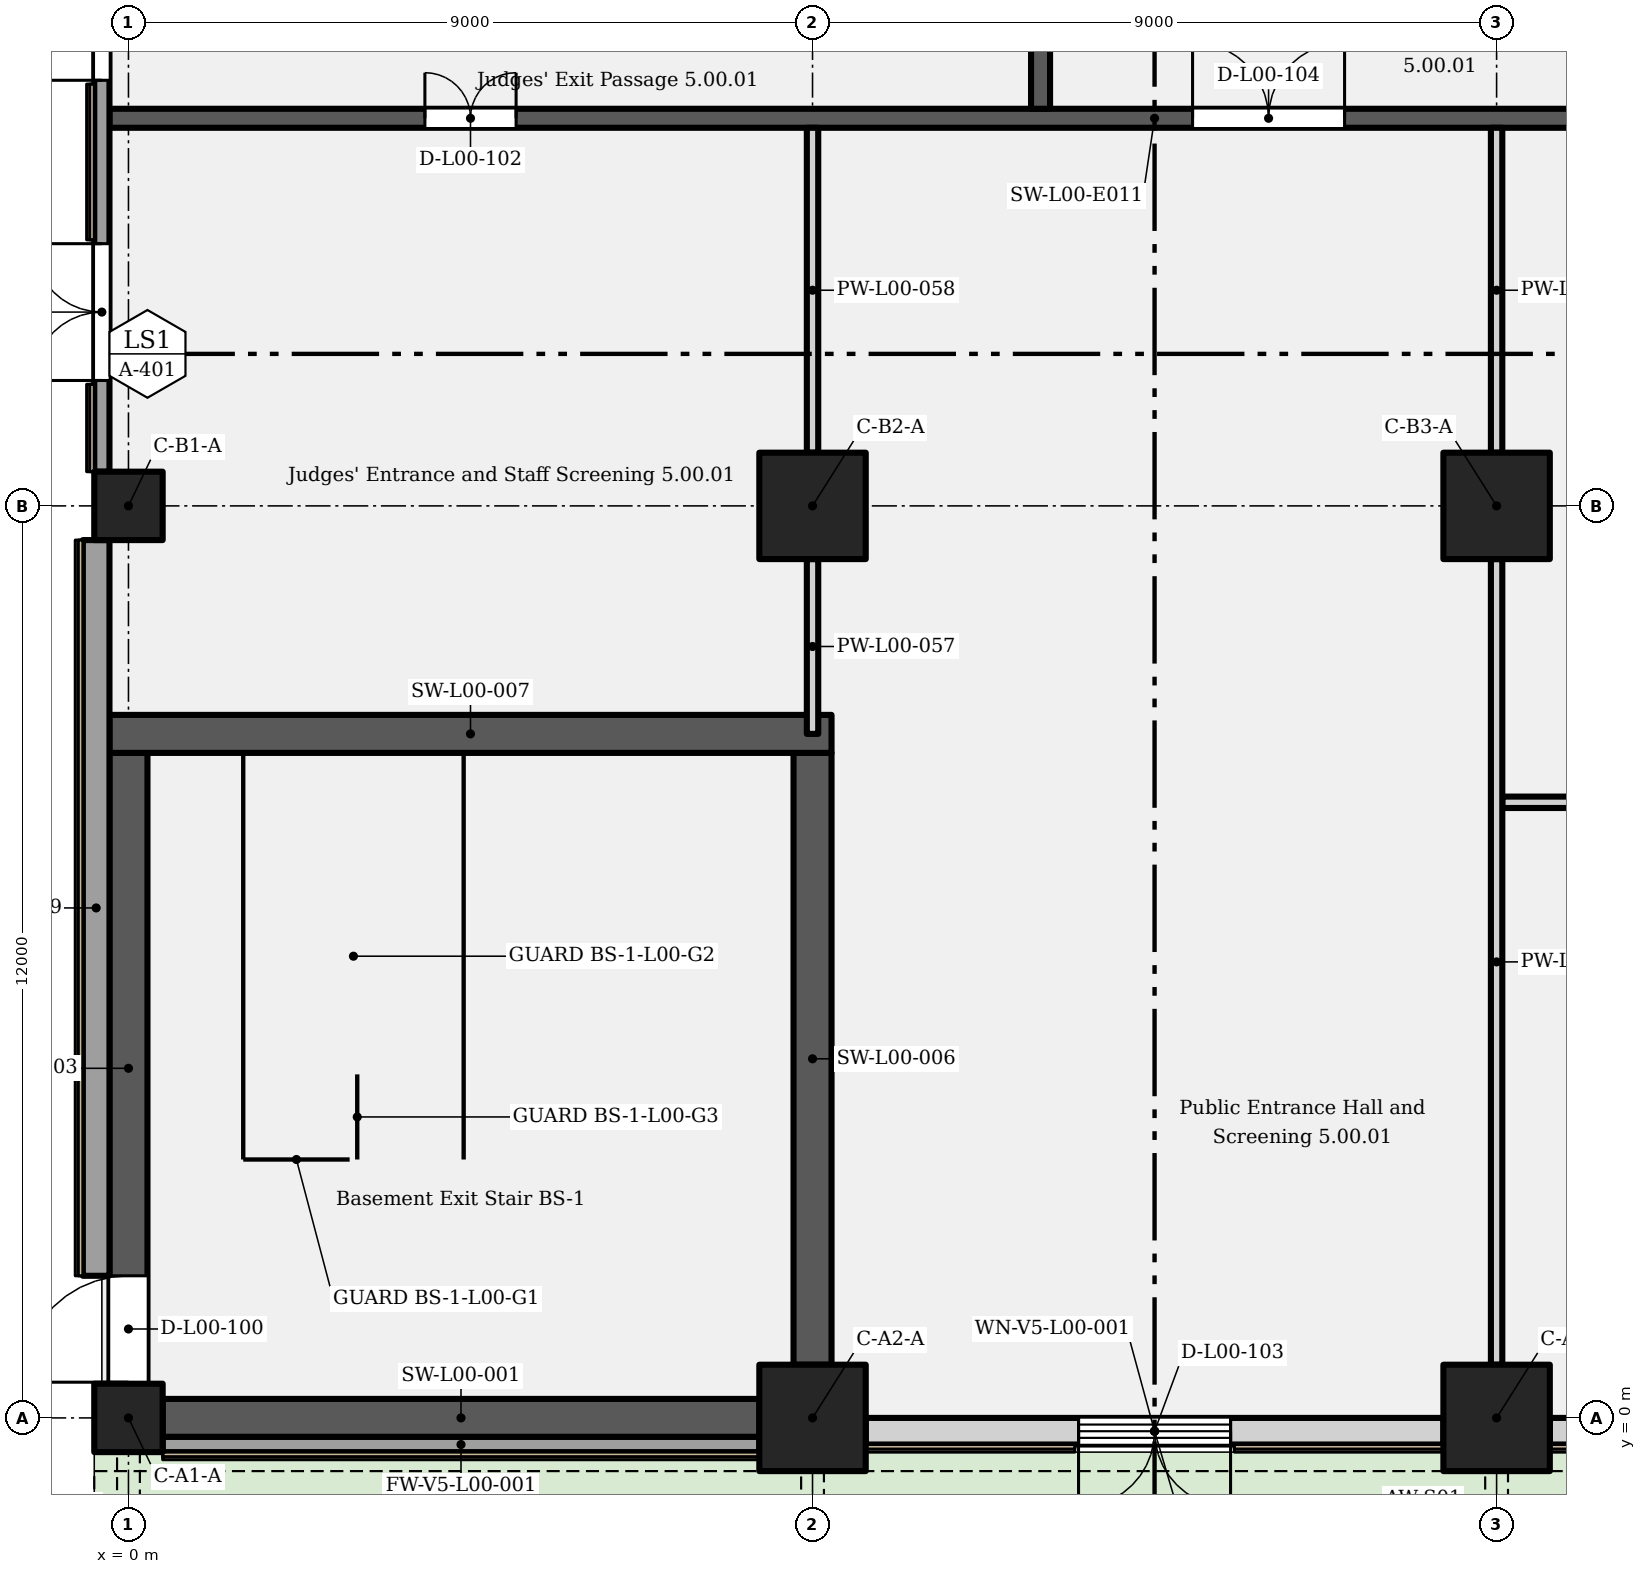
"""IFC4 building model, lengths in metres.
Left out: names, types, materials, properties, quantities, classifications, styles, units other than length and angle.
Written with IfcOpenShell. Run it as: python <this file> out.ifc"""

import sys

from ifc_helpers import new_model, si_unit, direction, frame, frame_2d, origin, origin_with_axes, origin_2d, place, context, subcontext, project, spatial, rectangle, extrude, element, fill, save


model = new_model("IFC4")
c1 = context("Model", 3, precision=1e-05, world=origin(), true_north=direction((0.0, 1.0)))
c2 = subcontext(c1, "Body", "Model", "MODEL_VIEW")
j1 = project(units=[si_unit("LENGTHUNIT", "METRE"), si_unit("PLANEANGLEUNIT", "RADIAN")], contexts=[c1])
p1 = place(None, origin())
s1 = spatial("IfcSite", under=j1, at=p1, CompositionType="ELEMENT")
p2 = place(p1, origin())
s2 = spatial("IfcBuilding", under=s1, at=p2, CompositionType="ELEMENT")
p3 = place(p2, origin())
s3 = spatial("IfcBuildingStorey", under=s2, at=p3, CompositionType="ELEMENT", Elevation=0.0)
p4 = place(p3, origin_with_axes())
e1 = element("IfcColumn", 1, at=p4, inside=s3, PredefinedType="COLUMN", context=c2, shape_type="SweptSolid", body=[
    extrude(rectangle(XDim=0.9, YDim=0.9, at=origin_2d()), origin(), (0.0, 0.0, 1.0), 6.6),
])
for number, where, z_axis, x_axis in (
    (2, (9.0, 0.0, 0.0), (0.0, 0.0, 1.0), (1.0, 0.0, 0.0)),
    (3, (18.0, 0.0, 0.0), (0.0, 0.0, 1.0), (1.0, 0.0, 0.0)),
):
    element("IfcColumn", number, at=place(p3, frame(where, z_axis=z_axis, x_axis=x_axis)), inside=s3, PredefinedType="COLUMN", context=c2, shape_type="SweptSolid", body=[
        extrude(rectangle(XDim=1.4, YDim=1.4, at=origin_2d()), origin(), (0.0, 0.0, 1.0), 6.6),
    ])
p5 = place(p3, frame((0.0, 12.0, 0.0), z_axis=(0.0, 0.0, 1.0), x_axis=(1.0, 0.0, 0.0)))
e4 = element("IfcColumn", 4, at=p5, inside=s3, PredefinedType="COLUMN", context=c2, shape_type="SweptSolid", body=[
    extrude(rectangle(XDim=0.9, YDim=0.9, at=origin_2d()), origin(), (0.0, 0.0, 1.0), 6.6),
])
for number, where, z_axis, x_axis in (
    (5, (9.0, 12.0, 0.0), (0.0, 0.0, 1.0), (1.0, 0.0, 0.0)),
    (6, (18.0, 12.0, 0.0), (0.0, 0.0, 1.0), (1.0, 0.0, 0.0)),
):
    element("IfcColumn", number, at=place(p3, frame(where, z_axis=z_axis, x_axis=x_axis)), inside=s3, PredefinedType="COLUMN", context=c2, shape_type="SweptSolid", body=[
        extrude(rectangle(XDim=1.4, YDim=1.4, at=origin_2d()), origin(), (0.0, 0.0, 1.0), 6.6),
    ])
p6 = place(p3, frame((0.45, 0.0, 0.0), z_axis=(0.0, 0.0, 1.0), x_axis=(1.0, 0.0, 0.0)))
e7 = element("IfcWall", 7, at=p6, inside=s3, PredefinedType="SHEAR", context=c2, shape_type="SweptSolid", body=[
    extrude(rectangle(XDim=7.85, YDim=0.5, at=frame_2d((3.925, 0.0))), origin(), (0.0, 0.0, 1.0), 6.3),
])
p7 = place(p3, frame((0.0, 0.45, 0.0), z_axis=(0.0, 0.0, 1.0), x_axis=(0.0, 1.0, 0.0)))
e8 = element("IfcWall", 8, at=p7, inside=s3, PredefinedType="SHEAR", context=c2, shape_type="SweptSolid", body=[
    extrude(rectangle(XDim=8.3, YDim=0.5, at=frame_2d((4.15, 0.0))), origin(), (0.0, 0.0, 1.0), 6.3),
])
p8 = place(p7, frame((0.02, 0.0, 0.0)))
e9 = element("IfcOpeningElement", 9, at=p8, cuts=e8, PredefinedType="OPENING", context=c2, shape_type="SweptSolid", body=[
    extrude(rectangle(XDim=1.4, YDim=2.1, at=frame_2d((0.7, 1.05))), frame((0.0, 0.26, 0.0), z_axis=(0.0, -1.0, 0.0), x_axis=(1.0, 0.0, 0.0)), (0.0, 0.0, 1.0), 0.52),
])
p9 = place(p3, frame((9.0, 0.7, 0.0), z_axis=(0.0, 0.0, 1.0), x_axis=(0.0, 1.0, 0.0)))
e10 = element("IfcWall", 10, at=p9, inside=s3, PredefinedType="SHEAR", context=c2, shape_type="SweptSolid", body=[
    extrude(rectangle(XDim=8.05, YDim=0.5, at=frame_2d((4.025, 0.0))), origin(), (0.0, 0.0, 1.0), 6.3),
])
p10 = place(p3, frame((-0.25, 9.0, 0.0), z_axis=(0.0, 0.0, 1.0), x_axis=(1.0, 0.0, 0.0)))
e11 = element("IfcWall", 11, at=p10, inside=s3, PredefinedType="SHEAR", context=c2, shape_type="SweptSolid", body=[
    extrude(rectangle(XDim=9.5, YDim=0.5, at=frame_2d((4.75, 0.0))), origin(), (0.0, 0.0, 1.0), 6.3),
])
p11 = place(p3, frame((0.45, -0.35, 0.0), z_axis=(0.0, 0.0, 1.0), x_axis=(1.0, 0.0, 0.0)))
e12 = element("IfcWall", 12, at=p11, inside=s3, PredefinedType="SOLIDWALL", context=c2, shape_type="SweptSolid", body=[
    extrude(rectangle(XDim=7.85, YDim=0.2, at=frame_2d((3.925, 0.0))), origin(), (0.0, 0.0, 1.0), 6.3),
])
p12 = place(p3, frame((9.7, -0.175, 0.0), z_axis=(0.0, 0.0, 1.0), x_axis=(1.0, 0.0, 0.0)))
e13 = element("IfcWall", 13, at=p12, inside=s3, PredefinedType="SOLIDWALL", context=c2, shape_type="SweptSolid", body=[
    extrude(rectangle(XDim=7.6, YDim=0.35, at=frame_2d((3.8, 0.0))), origin(), (0.0, 0.0, 1.0), 6.3),
])
p13 = place(p12, frame((4.8, 0.0, 0.0), z_axis=(0.0, 0.0, 1.0), x_axis=(-1.0, 0.0, 0.0)))
e14 = element("IfcOpeningElement", 14, at=p13, cuts=e13, PredefinedType="OPENING", context=c2, shape_type="SweptSolid", body=[
    extrude(rectangle(XDim=2.0, YDim=2.1, at=frame_2d((1.0, 1.05))), frame((0.0, 0.185, 0.0), z_axis=(0.0, -1.0, 0.0), x_axis=(1.0, 0.0, 0.0)), (0.0, 0.0, 1.0), 0.37),
])
p14 = place(p12, frame((2.8, 0.0, 2.25)))
e15 = element("IfcOpeningElement", 15, at=p14, cuts=e13, PredefinedType="OPENING", context=c2, shape_type="SweptSolid", body=[
    extrude(rectangle(XDim=2.0, YDim=0.8, at=frame_2d((1.0, 0.4))), frame((0.0, 0.185, 0.0), z_axis=(0.0, -1.0, 0.0), x_axis=(1.0, 0.0, 0.0)), (0.0, 0.0, 1.0), 0.37),
])
p15 = place(p3, frame((18.7, -0.175, 0.0), z_axis=(0.0, 0.0, 1.0), x_axis=(1.0, 0.0, 0.0)))
e16 = element("IfcWall", 16, at=p15, inside=s3, PredefinedType="SOLIDWALL", context=c2, shape_type="SweptSolid", body=[
    extrude(rectangle(XDim=7.6, YDim=0.35, at=frame_2d((3.8, 0.0))), origin(), (0.0, 0.0, 1.0), 6.3),
])
p16 = place(p3, frame((-0.425, 1.87, 0.0), z_axis=(0.0, 0.0, 1.0), x_axis=(0.0, 1.0, 0.0)))
e17 = element("IfcWall", 17, at=p16, inside=s3, PredefinedType="SOLIDWALL", context=c2, shape_type="SweptSolid", body=[
    extrude(rectangle(XDim=9.68, YDim=0.35, at=frame_2d((4.84, 0.0))), origin(), (0.0, 0.0, 1.0), 6.3),
])
p17 = place(p3, frame((-0.35, 12.45, 0.0), z_axis=(0.0, 0.0, 1.0), x_axis=(0.0, 1.0, 0.0)))
e18 = element("IfcWall", 18, at=p17, inside=s3, PredefinedType="SOLIDWALL", context=c2, shape_type="SweptSolid", body=[
    extrude(rectangle(XDim=15.6, YDim=0.2, at=frame_2d((7.8, 0.0))), origin(), (0.0, 0.0, 1.0), 6.3),
])
p18 = place(p17, frame((1.2, 0.0, 0.0)))
e19 = element("IfcOpeningElement", 19, at=p18, cuts=e18, PredefinedType="OPENING", context=c2, shape_type="SweptSolid", body=[
    extrude(rectangle(XDim=1.8, YDim=2.1, at=frame_2d((0.9, 1.05))), frame((0.0, 0.11, 0.0), z_axis=(0.0, -1.0, 0.0), x_axis=(1.0, 0.0, 0.0)), (0.0, 0.0, 1.0), 0.22),
])
p19 = place(p17, frame((5.15, 0.0, 0.0)))
e20 = element("IfcOpeningElement", 20, at=p19, cuts=e18, PredefinedType="OPENING", context=c2, shape_type="SweptSolid", body=[
    extrude(rectangle(XDim=1.4, YDim=2.1, at=frame_2d((0.7, 1.05))), frame((0.0, 0.11, 0.0), z_axis=(0.0, -1.0, 0.0), x_axis=(1.0, 0.0, 0.0)), (0.0, 0.0, 1.0), 0.22),
])
p20 = place(p3, frame((18.075, 8.1, 0.0), z_axis=(0.0, 0.0, 1.0), x_axis=(1.0, 0.0, 0.0)))
e21 = element("IfcWall", 21, at=p20, inside=s3, PredefinedType="PARTITIONING", context=c2, shape_type="SweptSolid", body=[
    extrude(rectangle(XDim=4.5, YDim=0.15, at=frame_2d((2.25, 0.0))), origin(), (0.0, 0.0, 1.0), 6.3),
])
p21 = place(p20, frame((2.675, 0.0, 0.0), z_axis=(0.0, 0.0, 1.0), x_axis=(-1.0, 0.0, 0.0)))
e22 = element("IfcOpeningElement", 22, at=p21, cuts=e21, PredefinedType="OPENING", context=c2, shape_type="SweptSolid", body=[
    extrude(rectangle(XDim=1.0, YDim=2.1, at=frame_2d((0.5, 1.05))), frame((0.0, 0.085, 0.0), z_axis=(0.0, -1.0, 0.0), x_axis=(1.0, 0.0, 0.0)), (0.0, 0.0, 1.0), 0.17),
])
p22 = place(p3, frame((-0.25, 17.1, 0.0), z_axis=(0.0, 0.0, 1.0), x_axis=(1.0, 0.0, 0.0)))
e23 = element("IfcWall", 23, at=p22, inside=s3, PredefinedType="SHEAR", context=c2, shape_type="SweptSolid", body=[
    extrude(rectangle(XDim=27.5, YDim=0.25, at=frame_2d((13.75, 0.0))), origin(), (0.0, 0.0, 1.0), 6.3),
])
p23 = place(p22, frame((4.15, 0.0, 0.0)))
e24 = element("IfcOpeningElement", 24, at=p23, cuts=e23, PredefinedType="OPENING", context=c2, shape_type="SweptSolid", body=[
    extrude(rectangle(XDim=1.2, YDim=2.1, at=frame_2d((0.6, 1.05))), frame((0.0, 0.135, 0.0), z_axis=(0.0, -1.0, 0.0), x_axis=(1.0, 0.0, 0.0)), (0.0, 0.0, 1.0), 0.27),
])
p24 = place(p22, frame((14.25, 0.0, 0.0)))
e25 = element("IfcOpeningElement", 25, at=p24, cuts=e23, PredefinedType="OPENING", context=c2, shape_type="SweptSolid", body=[
    extrude(rectangle(XDim=2.0, YDim=2.1, at=frame_2d((1.0, 1.05))), frame((0.0, 0.135, 0.0), z_axis=(0.0, -1.0, 0.0), x_axis=(1.0, 0.0, 0.0)), (0.0, 0.0, 1.0), 0.27),
])
p25 = place(p22, frame((20.0, 0.0, 0.0)))
e26 = element("IfcOpeningElement", 26, at=p25, cuts=e23, PredefinedType="OPENING", context=c2, shape_type="SweptSolid", body=[
    extrude(rectangle(XDim=1.0, YDim=2.1, at=frame_2d((0.5, 1.05))), frame((0.0, 0.135, 0.0), z_axis=(0.0, -1.0, 0.0), x_axis=(1.0, 0.0, 0.0)), (0.0, 0.0, 1.0), 0.27),
])
p26 = place(p22, frame((23.45, 0.0, 0.0)))
e27 = element("IfcOpeningElement", 27, at=p26, cuts=e23, PredefinedType="OPENING", context=c2, shape_type="SweptSolid", body=[
    extrude(rectangle(XDim=0.9, YDim=2.1, at=frame_2d((0.45, 1.05))), frame((0.0, 0.135, 0.0), z_axis=(0.0, -1.0, 0.0), x_axis=(1.0, 0.0, 0.0)), (0.0, 0.0, 1.0), 0.27),
])
p27 = place(p22, frame((25.45, 0.0, 0.0)))
e28 = element("IfcOpeningElement", 28, at=p27, cuts=e23, PredefinedType="OPENING", context=c2, shape_type="SweptSolid", body=[
    extrude(rectangle(XDim=0.9, YDim=2.1, at=frame_2d((0.45, 1.05))), frame((0.0, 0.135, 0.0), z_axis=(0.0, -1.0, 0.0), x_axis=(1.0, 0.0, 0.0)), (0.0, 0.0, 1.0), 0.27),
])
p28 = place(p3, frame((9.0, 9.0, 0.0), z_axis=(0.0, 0.0, 1.0), x_axis=(0.0, 1.0, 0.0)))
e29 = element("IfcWall", 29, at=p28, inside=s3, PredefinedType="PARTITIONING", context=c2, shape_type="SweptSolid", body=[
    extrude(rectangle(XDim=2.3, YDim=0.15, at=frame_2d((1.15, 0.0))), origin(), (0.0, 0.0, 1.0), 5.55),
])
p29 = place(p3, frame((9.0, 12.7, 0.0), z_axis=(0.0, 0.0, 1.0), x_axis=(0.0, 1.0, 0.0)))
e30 = element("IfcWall", 30, at=p29, inside=s3, PredefinedType="PARTITIONING", context=c2, shape_type="SweptSolid", body=[
    extrude(rectangle(XDim=4.275, YDim=0.15, at=frame_2d((2.138, 0.0))), origin(), (0.0, 0.0, 1.0), 5.35),
])
p30 = place(p3, frame((12.0, 17.225, 0.0), z_axis=(0.0, 0.0, 1.0), x_axis=(0.0, 1.0, 0.0)))
e31 = element("IfcWall", 31, at=p30, inside=s3, PredefinedType="SHEAR", context=c2, shape_type="SweptSolid", body=[
    extrude(rectangle(XDim=2.15, YDim=0.25, at=frame_2d((1.075, 0.0))), origin(), (0.0, 0.0, 1.0), 6.3),
])
p31 = place(p3, frame((18.0, 0.7, 0.0), z_axis=(0.0, 0.0, 1.0), x_axis=(0.0, 1.0, 0.0)))
e32 = element("IfcWall", 32, at=p31, inside=s3, PredefinedType="PARTITIONING", context=c2, shape_type="SweptSolid", body=[
    extrude(rectangle(XDim=10.6, YDim=0.15, at=frame_2d((5.3, 0.0))), origin(), (0.0, 0.0, 1.0), 5.55),
])
p32 = place(p3, frame((18.0, 12.7, 0.0), z_axis=(0.0, 0.0, 1.0), x_axis=(0.0, 1.0, 0.0)))
e33 = element("IfcWall", 33, at=p32, inside=s3, PredefinedType="PARTITIONING", context=c2, shape_type="SweptSolid", body=[
    extrude(rectangle(XDim=4.275, YDim=0.15, at=frame_2d((2.138, 0.0))), origin(), (0.0, 0.0, 1.0), 5.35),
])
p33 = place(p13, origin())
e34 = element("IfcDoor", 34, at=p33, inside=s3, OperationType="DOUBLE_DOOR_SINGLE_SWING", PredefinedType="DOOR", context=c2, shape_type="SweptSolid", body=[
    extrude(rectangle(XDim=2.0, YDim=2.1, at=frame_2d((1.0, 1.05))), frame((0.0, 0.025, 0.0), z_axis=(0.0, -1.0, 0.0), x_axis=(1.0, 0.0, 0.0)), (0.0, 0.0, 1.0), 0.05),
])
fill(e14, e34)
p34 = place(p14, origin())
e35 = element("IfcWindow", 35, at=p34, inside=s3, PartitioningType="SINGLE_PANEL", PredefinedType="WINDOW", context=c2, shape_type="SweptSolid", body=[
    extrude(rectangle(XDim=2.0, YDim=0.8, at=frame_2d((1.0, 0.4))), frame((0.0, 0.03, 0.0), z_axis=(0.0, -1.0, 0.0), x_axis=(1.0, 0.0, 0.0)), (0.0, 0.0, 1.0), 0.06),
])
fill(e15, e35)
p35 = place(p8, origin())
e36 = element("IfcDoor", 36, at=p35, inside=s3, OperationType="SINGLE_SWING_RIGHT", PredefinedType="DOOR", context=c2, shape_type="SweptSolid", body=[
    extrude(rectangle(XDim=1.4, YDim=2.1, at=frame_2d((0.7, 1.05))), frame((0.0, 0.025, 0.0), z_axis=(0.0, -1.0, 0.0), x_axis=(1.0, 0.0, 0.0)), (0.0, 0.0, 1.0), 0.05),
])
fill(e9, e36)
p36 = place(p18, origin())
e37 = element("IfcDoor", 37, at=p36, inside=s3, OperationType="DOUBLE_DOOR_SINGLE_SWING", PredefinedType="DOOR", context=c2, shape_type="SweptSolid", body=[
    extrude(rectangle(XDim=1.8, YDim=2.1, at=frame_2d((0.9, 1.05))), frame((0.0, 0.025, 0.0), z_axis=(0.0, -1.0, 0.0), x_axis=(1.0, 0.0, 0.0)), (0.0, 0.0, 1.0), 0.05),
])
fill(e19, e37)
p37 = place(p19, origin())
e38 = element("IfcDoor", 38, at=p37, inside=s3, OperationType="SINGLE_SWING_RIGHT", PredefinedType="DOOR", context=c2, shape_type="SweptSolid", body=[
    extrude(rectangle(XDim=1.4, YDim=2.1, at=frame_2d((0.7, 1.05))), frame((0.0, 0.025, 0.0), z_axis=(0.0, -1.0, 0.0), x_axis=(1.0, 0.0, 0.0)), (0.0, 0.0, 1.0), 0.05),
])
fill(e20, e38)
p38 = place(p23, origin())
e39 = element("IfcDoor", 39, at=p38, inside=s3, OperationType="DOUBLE_DOOR_SINGLE_SWING", PredefinedType="DOOR", context=c2, shape_type="SweptSolid", body=[
    extrude(rectangle(XDim=1.2, YDim=2.1, at=frame_2d((0.6, 1.05))), frame((0.0, 0.025, 0.0), z_axis=(0.0, -1.0, 0.0), x_axis=(1.0, 0.0, 0.0)), (0.0, 0.0, 1.0), 0.05),
])
fill(e24, e39)
p39 = place(p24, origin())
e40 = element("IfcDoor", 40, at=p39, inside=s3, OperationType="DOUBLE_DOOR_SINGLE_SWING", PredefinedType="DOOR", context=c2, shape_type="SweptSolid", body=[
    extrude(rectangle(XDim=2.0, YDim=2.1, at=frame_2d((1.0, 1.05))), frame((0.0, 0.025, 0.0), z_axis=(0.0, -1.0, 0.0), x_axis=(1.0, 0.0, 0.0)), (0.0, 0.0, 1.0), 0.05),
])
fill(e25, e40)
save(model, sys.argv[1])
